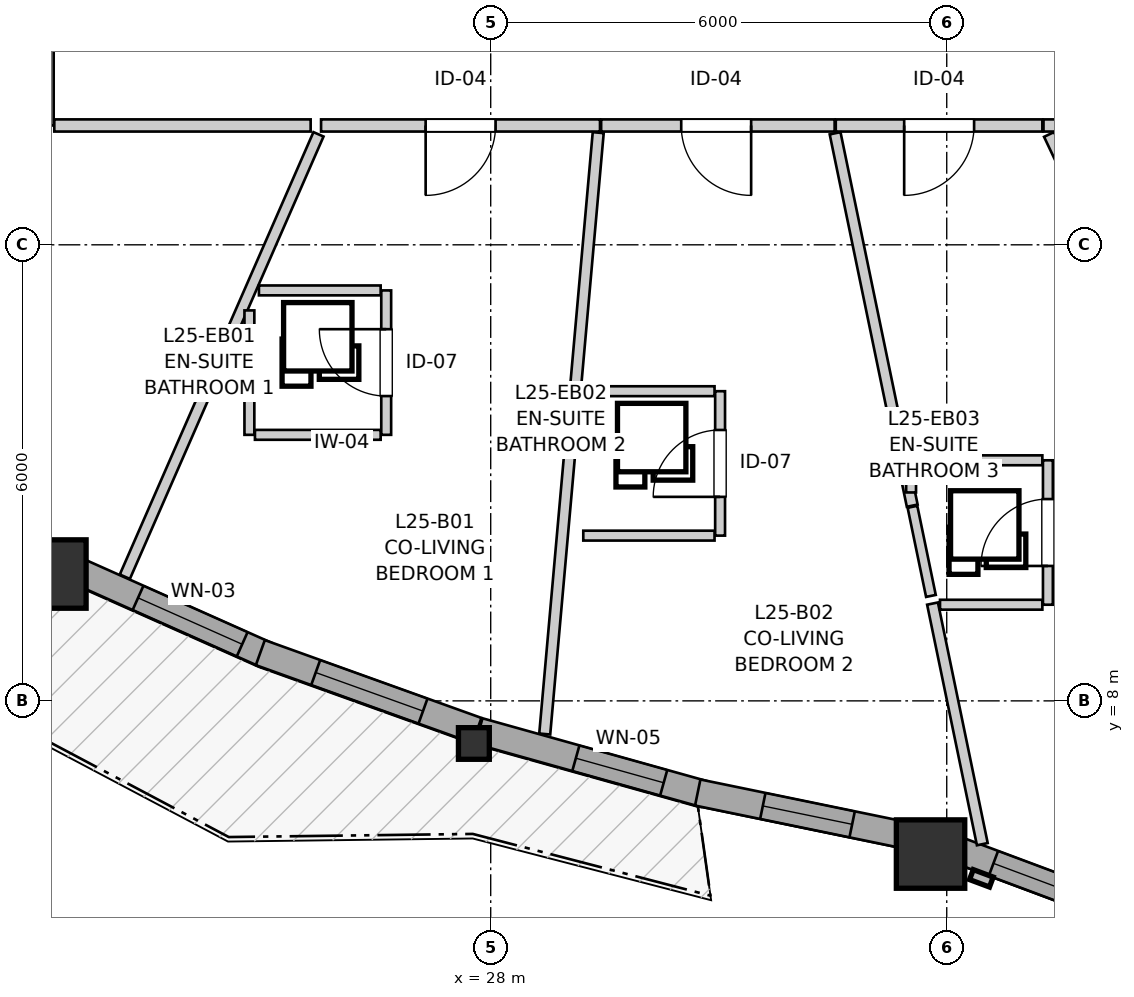
"""IFC4 building model, lengths in metres.
Left out: names, types, materials, properties, quantities, classifications, styles, units other than length and angle.
Written with IfcOpenShell. Run it as: python <this file> out.ifc"""

import sys

from ifc_helpers import new_model, si_unit, direction, frame, frame_2d, origin, origin_2d, place, context, subcontext, project, spatial, rectangle, i_section, extrude, source, transform, mapped, element, fill, save


model = new_model("IFC4")
c1 = context("Model", 3, precision=1e-05, world=origin(), true_north=direction((0.0, 1.0)))
c2 = subcontext(c1, "Body", "Model", "MODEL_VIEW")
j1 = project(units=[si_unit("LENGTHUNIT", "METRE"), si_unit("PLANEANGLEUNIT", "RADIAN")], contexts=[c1])
p1 = place(None, origin())
s1 = spatial("IfcSite", under=j1, at=p1, CompositionType="ELEMENT")
p2 = place(p1, origin())
s2 = spatial("IfcBuilding", under=s1, at=p2, CompositionType="ELEMENT")
p3 = place(p2, frame((0.0, 0.0, 86.4)))
s3 = spatial("IfcBuildingStorey", under=s2, at=p3, CompositionType="ELEMENT", Elevation=86.4)
m1 = source(origin(), c2, "Body", "SweptSolid", [
    extrude(rectangle(XDim=0.9, YDim=0.9, at=origin_2d()), origin(), (0.0, 0.0, 1.0), 2.95),
])
p4 = place(p3, frame((22.227, 9.669, 0.0), z_axis=(0.0, 0.0, 1.0), x_axis=(1.0, 0.0, 0.0)))
e1 = element("IfcColumn", 1, at=p4, inside=s3, PredefinedType="COLUMN", context=c2, shape_type="MappedRepresentation", body=[
    mapped(m1, transform((0.0, 0.0, 0.0), x_axis=(1.0, 0.0, 0.0), y_axis=(0.0, 1.0, 0.0), z_axis=(0.0, 0.0, 1.0), scale=1.0)),
])
m2 = source(origin(), c2, "Body", "SweptSolid", [
    extrude(i_section(OverallWidth=0.406, OverallDepth=0.416, WebThickness=0.027, FlangeThickness=0.044, FilletRadius=0.015, at=origin_2d()), origin(), (0.0, 0.0, 1.0), 2.95),
])
p5 = place(p3, frame((27.779, 7.439, 0.0), z_axis=(0.0, 0.0, 1.0), x_axis=(1.0, 0.0, 0.0)))
e2 = element("IfcColumn", 2, at=p5, inside=s3, PredefinedType="PILASTER", context=c2, shape_type="MappedRepresentation", body=[
    mapped(m2, transform((0.0, 0.0, 0.0), x_axis=(1.0, 0.0, 0.0), y_axis=(0.0, 1.0, 0.0), z_axis=(0.0, 0.0, 1.0), scale=1.0)),
])
p6 = place(p3, frame((33.787, 5.985, 0.0), z_axis=(0.0, 0.0, 1.0), x_axis=(1.0, 0.0, 0.0)))
e3 = element("IfcColumn", 3, at=p6, inside=s3, PredefinedType="COLUMN", context=c2, shape_type="MappedRepresentation", body=[
    mapped(m1, transform((0.0, 0.0, 0.0), x_axis=(1.0, 0.0, 0.0), y_axis=(0.0, 1.0, 0.0), z_axis=(0.0, 0.0, 1.0), scale=1.0)),
])
p7 = place(p3, frame((22.503, 9.737, 0.0), z_axis=(0.0, 0.0, 1.0), x_axis=(0.913443049169, -0.406966578388, 0.0)))
e4 = element("IfcWall", 4, at=p7, inside=s3, PredefinedType="SOLIDWALL", context=c2, shape_type="SweptSolid", body=[
    extrude(rectangle(XDim=2.79, YDim=0.35, at=frame_2d((1.395, 0.0))), origin(), (0.0, 0.0, 1.0), 2.48),
])
p8 = place(p7, frame((0.938, 0.0, 0.82)))
e5 = element("IfcOpeningElement", 5, at=p8, cuts=e4, PredefinedType="OPENING", context=c2, shape_type="SweptSolid", body=[
    extrude(rectangle(XDim=1.5, YDim=1.45, at=frame_2d((0.75, 0.725))), frame((0.0, 0.185, 0.0), z_axis=(0.0, -1.0, 0.0), x_axis=(1.0, 0.0, 0.0)), (0.0, 0.0, 1.0), 0.37),
])
p9 = place(p3, frame((24.969, 8.635, 0.0), z_axis=(0.0, 0.0, 1.0), x_axis=(0.941099972293, -0.338128440315, 0.0)))
e6 = element("IfcWall", 6, at=p9, inside=s3, PredefinedType="SOLIDWALL", context=c2, shape_type="SweptSolid", body=[
    extrude(rectangle(XDim=3.028, YDim=0.35, at=frame_2d((1.514, 0.0))), origin(), (0.0, 0.0, 1.0), 2.48),
])
p10 = place(p9, frame((0.774, 0.0, 0.82)))
e7 = element("IfcOpeningElement", 7, at=p10, cuts=e6, PredefinedType="OPENING", context=c2, shape_type="SweptSolid", body=[
    extrude(rectangle(XDim=1.5, YDim=1.45, at=frame_2d((0.75, 0.725))), frame((0.0, 0.185, 0.0), z_axis=(0.0, -1.0, 0.0), x_axis=(1.0, 0.0, 0.0)), (0.0, 0.0, 1.0), 0.37),
])
p11 = place(p3, frame((27.845, 7.603, 0.0), z_axis=(0.0, 0.0, 1.0), x_axis=(0.963041412051, -0.269353371382, 0.0)))
e8 = element("IfcWall", 8, at=p11, inside=s3, PredefinedType="SOLIDWALL", context=c2, shape_type="SweptSolid", body=[
    extrude(rectangle(XDim=3.078, YDim=0.35, at=frame_2d((1.539, 0.0))), origin(), (0.0, 0.0, 1.0), 2.48),
])
p12 = place(p11, frame((1.324, 0.0, 0.82)))
e9 = element("IfcOpeningElement", 9, at=p12, cuts=e8, PredefinedType="OPENING", context=c2, shape_type="SweptSolid", body=[
    extrude(rectangle(XDim=1.2, YDim=1.45, at=frame_2d((0.6, 0.725))), frame((0.0, 0.185, 0.0), z_axis=(0.0, -1.0, 0.0), x_axis=(1.0, 0.0, 0.0)), (0.0, 0.0, 1.0), 0.37),
])
p13 = place(p3, frame((30.724, 6.794, 0.0), z_axis=(0.0, 0.0, 1.0), x_axis=(0.979439663571, -0.201737317878, 0.0)))
e10 = element("IfcWall", 10, at=p13, inside=s3, PredefinedType="SOLIDWALL", context=c2, shape_type="SweptSolid", body=[
    extrude(rectangle(XDim=2.938, YDim=0.35, at=frame_2d((1.469, 0.0))), origin(), (0.0, 0.0, 1.0), 2.48),
])
p14 = place(p13, frame((0.874, 0.0, 0.82)))
e11 = element("IfcOpeningElement", 11, at=p14, cuts=e10, PredefinedType="OPENING", context=c2, shape_type="SweptSolid", body=[
    extrude(rectangle(XDim=1.2, YDim=1.45, at=frame_2d((0.6, 0.725))), frame((0.0, 0.185, 0.0), z_axis=(0.0, -1.0, 0.0), x_axis=(1.0, 0.0, 0.0)), (0.0, 0.0, 1.0), 0.37),
])
p15 = place(p3, frame((34.059, 6.07, 0.0), z_axis=(0.0, 0.0, 1.0), x_axis=(0.936803747811, -0.349855310219, 0.0)))
e12 = element("IfcWall", 12, at=p15, inside=s3, PredefinedType="SOLIDWALL", context=c2, shape_type="SweptSolid", body=[
    extrude(rectangle(XDim=1.836, YDim=0.35, at=frame_2d((0.918, 0.0))), origin(), (0.0, 0.0, 1.0), 2.48),
])
p16 = place(p15, frame((0.593, 0.0, 0.82)))
e13 = element("IfcOpeningElement", 13, at=p16, cuts=e12, PredefinedType="OPENING", context=c2, shape_type="SweptSolid", body=[
    extrude(rectangle(XDim=0.95, YDim=1.35, at=frame_2d((0.475, 0.675))), frame((0.0, 0.185, 0.0), z_axis=(0.0, -1.0, 0.0), x_axis=(1.0, 0.0, 0.0)), (0.0, 0.0, 1.0), 0.37),
])
p17 = place(p3, frame((22.17, 15.57, 0.0), z_axis=(0.0, 0.0, 1.0), x_axis=(0.0, 1.0, 0.0)))
e14 = element("IfcWall", 14, at=p17, inside=s3, PredefinedType="PARTITIONING", context=c2, shape_type="SweptSolid", body=[
    extrude(rectangle(XDim=5.543, YDim=0.16, at=frame_2d((2.771, 0.0))), origin(), (0.0, 0.0, 1.0), 2.95),
])
p18 = place(p17, frame((2.283, 0.0, 0.0)))
e15 = element("IfcOpeningElement", 15, at=p18, cuts=e14, PredefinedType="OPENING", context=c2, shape_type="SweptSolid", body=[
    extrude(rectangle(XDim=0.96, YDim=2.1, at=frame_2d((0.48, 1.05))), frame((0.0, 0.09, 0.0), z_axis=(0.0, -1.0, 0.0), x_axis=(1.0, 0.0, 0.0)), (0.0, 0.0, 1.0), 0.18),
])
p19 = place(p3, frame((29.438, 15.57, 0.0), z_axis=(0.0, 0.0, 1.0), x_axis=(-1.0, 0.0, 0.0)))
e16 = element("IfcWall", 16, at=p19, inside=s3, PredefinedType="PARTITIONING", context=c2, shape_type="SweptSolid", body=[
    extrude(rectangle(XDim=3.67, YDim=0.16, at=frame_2d((1.835, 0.0))), origin(), (0.0, 0.0, 1.0), 2.95),
])
p20 = place(p19, frame((1.374, 0.0, 0.0)))
e17 = element("IfcOpeningElement", 17, at=p20, cuts=e16, PredefinedType="OPENING", context=c2, shape_type="SweptSolid", body=[
    extrude(rectangle(XDim=0.92, YDim=2.1, at=frame_2d((0.46, 1.05))), frame((0.0, 0.09, 0.0), z_axis=(0.0, -1.0, 0.0), x_axis=(1.0, 0.0, 0.0)), (0.0, 0.0, 1.0), 0.18),
])
p21 = place(p3, frame((38.53, 15.57, 0.0), z_axis=(0.0, 0.0, 1.0), x_axis=(-1.0, 0.0, 0.0)))
e18 = element("IfcWall", 18, at=p21, inside=s3, PredefinedType="PARTITIONING", context=c2, shape_type="SweptSolid", body=[
    extrude(rectangle(XDim=3.257, YDim=0.16, at=frame_2d((1.628, 0.0))), origin(), (0.0, 0.0, 1.0), 2.95),
])
p22 = place(p21, frame((1.16, 0.0, 0.0)))
e19 = element("IfcOpeningElement", 19, at=p22, cuts=e18, PredefinedType="OPENING", context=c2, shape_type="SweptSolid", body=[
    extrude(rectangle(XDim=0.92, YDim=2.1, at=frame_2d((0.46, 1.05))), frame((0.0, 0.09, 0.0), z_axis=(0.0, -1.0, 0.0), x_axis=(1.0, 0.0, 0.0)), (0.0, 0.0, 1.0), 0.18),
])
p23 = place(p3, frame((32.525, 15.57, 0.0), z_axis=(0.0, 0.0, 1.0), x_axis=(-1.0, 0.0, 0.0)))
e20 = element("IfcWall", 20, at=p23, inside=s3, PredefinedType="PARTITIONING", context=c2, shape_type="SweptSolid", body=[
    extrude(rectangle(XDim=3.072, YDim=0.16, at=frame_2d((1.536, 0.0))), origin(), (0.0, 0.0, 1.0), 2.95),
])
p24 = place(p23, frame((1.098, 0.0, 0.0)))
e21 = element("IfcOpeningElement", 21, at=p24, cuts=e20, PredefinedType="OPENING", context=c2, shape_type="SweptSolid", body=[
    extrude(rectangle(XDim=0.92, YDim=2.1, at=frame_2d((0.46, 1.05))), frame((0.0, 0.09, 0.0), z_axis=(0.0, -1.0, 0.0), x_axis=(1.0, 0.0, 0.0)), (0.0, 0.0, 1.0), 0.18),
])
p25 = place(p3, frame((35.258, 15.57, 0.0), z_axis=(0.0, 0.0, 1.0), x_axis=(-1.0, 0.0, 0.0)))
e22 = element("IfcWall", 22, at=p25, inside=s3, PredefinedType="PARTITIONING", context=c2, shape_type="SweptSolid", body=[
    extrude(rectangle(XDim=2.718, YDim=0.16, at=frame_2d((1.359, 0.0))), origin(), (0.0, 0.0, 1.0), 2.95),
])
p26 = place(p25, frame((0.898, 0.0, 0.0)))
e23 = element("IfcOpeningElement", 23, at=p26, cuts=e22, PredefinedType="OPENING", context=c2, shape_type="SweptSolid", body=[
    extrude(rectangle(XDim=0.92, YDim=2.1, at=frame_2d((0.46, 1.05))), frame((0.0, 0.09, 0.0), z_axis=(0.0, -1.0, 0.0), x_axis=(1.0, 0.0, 0.0)), (0.0, 0.0, 1.0), 0.18),
])
p27 = place(p3, frame((26.625, 11.5, 0.0), z_axis=(0.0, 0.0, 1.0), x_axis=(0.0, 1.0, 0.0)))
e24 = element("IfcWall", 24, at=p27, inside=s3, PredefinedType="PARTITIONING", context=c2, shape_type="SweptSolid", body=[
    extrude(rectangle(XDim=1.9, YDim=0.13, at=frame_2d((0.95, 0.0))), origin(), (0.0, 0.0, 1.0), 2.95),
])
p28 = place(p27, frame((0.51, 0.0, 0.0)))
e25 = element("IfcOpeningElement", 25, at=p28, cuts=e24, PredefinedType="OPENING", context=c2, shape_type="SweptSolid", body=[
    extrude(rectangle(XDim=0.88, YDim=2.05, at=frame_2d((0.44, 1.025))), frame((0.0, 0.075, 0.0), z_axis=(0.0, -1.0, 0.0), x_axis=(1.0, 0.0, 0.0)), (0.0, 0.0, 1.0), 0.15),
])
p29 = place(p3, frame((31.018, 10.174, 0.0), z_axis=(0.0, 0.0, 1.0), x_axis=(0.0, 1.0, 0.0)))
e26 = element("IfcWall", 26, at=p29, inside=s3, PredefinedType="PARTITIONING", context=c2, shape_type="SweptSolid", body=[
    extrude(rectangle(XDim=1.9, YDim=0.13, at=frame_2d((0.95, 0.0))), origin(), (0.0, 0.0, 1.0), 2.95),
])
p30 = place(p29, frame((0.51, 0.0, 0.0)))
e27 = element("IfcOpeningElement", 27, at=p30, cuts=e26, PredefinedType="OPENING", context=c2, shape_type="SweptSolid", body=[
    extrude(rectangle(XDim=0.88, YDim=2.05, at=frame_2d((0.44, 1.025))), frame((0.0, 0.075, 0.0), z_axis=(0.0, -1.0, 0.0), x_axis=(1.0, 0.0, 0.0)), (0.0, 0.0, 1.0), 0.15),
])
p31 = place(p3, frame((35.331, 9.265, 0.0), z_axis=(0.0, 0.0, 1.0), x_axis=(0.0, 1.0, 0.0)))
e28 = element("IfcWall", 28, at=p31, inside=s3, PredefinedType="PARTITIONING", context=c2, shape_type="SweptSolid", body=[
    extrude(rectangle(XDim=1.9, YDim=0.13, at=frame_2d((0.95, 0.0))), origin(), (0.0, 0.0, 1.0), 2.95),
])
p32 = place(p31, frame((0.51, 0.0, 0.0)))
e29 = element("IfcOpeningElement", 29, at=p32, cuts=e28, PredefinedType="OPENING", context=c2, shape_type="SweptSolid", body=[
    extrude(rectangle(XDim=0.88, YDim=2.05, at=frame_2d((0.44, 1.025))), frame((0.0, 0.075, 0.0), z_axis=(0.0, -1.0, 0.0), x_axis=(1.0, 0.0, 0.0)), (0.0, 0.0, 1.0), 0.15),
])
p33 = place(p3, frame((28.711, 7.564, 0.0), z_axis=(0.0, 0.0, 1.0), x_axis=(0.088615013812, 0.996065951294, 0.0)))
e30 = element("IfcWall", 30, at=p33, inside=s3, PredefinedType="PARTITIONING", context=c2, shape_type="SweptSolid", body=[
    extrude(rectangle(XDim=7.943, YDim=0.145, at=frame_2d((3.971, 0.0))), origin(), (0.0, 0.0, 1.0), 2.95),
])
p34 = place(p3, frame((23.186, 9.634, 0.0), z_axis=(0.0, 0.0, 1.0), x_axis=(0.400994208685, 0.916080588486, 0.0)))
e31 = element("IfcWall", 31, at=p34, inside=s3, PredefinedType="PARTITIONING", context=c2, shape_type="SweptSolid", body=[
    extrude(rectangle(XDim=6.353, YDim=0.145, at=frame_2d((3.177, 0.0))), origin(), (0.0, 0.0, 1.0), 2.95),
])
p35 = place(p3, frame((32.531, 15.468, 0.0), z_axis=(0.0, 0.0, 1.0), x_axis=(0.202792769077, -0.979221677053, 0.0)))
e32 = element("IfcWall", 32, at=p35, inside=s3, PredefinedType="PARTITIONING", context=c2, shape_type="SweptSolid", body=[
    extrude(rectangle(XDim=5.003, YDim=0.145, at=frame_2d((2.502, 0.0))), origin(), (0.0, 0.0, 1.0), 2.95),
])
p36 = place(p3, frame((35.346, 15.452, 0.0), z_axis=(0.0, 0.0, 1.0), x_axis=(0.428023015228, -0.903767834366, 0.0)))
e33 = element("IfcWall", 33, at=p36, inside=s3, PredefinedType="PARTITIONING", context=c2, shape_type="SweptSolid", body=[
    extrude(rectangle(XDim=4.64, YDim=0.145, at=frame_2d((2.32, 0.0))), origin(), (0.0, 0.0, 1.0), 2.95),
])
p37 = place(p3, frame((22.258, 15.57, 0.0), z_axis=(0.0, 0.0, 1.0), x_axis=(1.0, 0.0, 0.0)))
e34 = element("IfcWall", 34, at=p37, inside=s3, PredefinedType="PARTITIONING", context=c2, shape_type="SweptSolid", body=[
    extrude(rectangle(XDim=3.373, YDim=0.16, at=frame_2d((1.687, 0.0))), origin(), (0.0, 0.0, 1.0), 2.95),
])
p38 = place(p3, frame((33.813, 9.28, 0.0), z_axis=(0.0, 0.0, 1.0), x_axis=(0.202648062782, -0.979251633979, 0.0)))
e35 = element("IfcWall", 35, at=p38, inside=s3, PredefinedType="PARTITIONING", context=c2, shape_type="SweptSolid", body=[
    extrude(rectangle(XDim=3.232, YDim=0.145, at=frame_2d((1.616, 0.0))), origin(), (0.0, 0.0, 1.0), 2.95),
])
p39 = place(p3, frame((24.825, 11.5, 0.0), z_axis=(0.0, 0.0, 1.0), x_axis=(0.0, 1.0, 0.0)))
e36 = element("IfcWall", 36, at=p39, inside=s3, PredefinedType="PARTITIONING", context=c2, shape_type="SweptSolid", body=[
    extrude(rectangle(XDim=1.637, YDim=0.13, at=frame_2d((0.818, 0.0))), origin(), (0.0, 0.0, 1.0), 2.95),
])
p40 = place(p3, frame((33.626, 11.165, 0.0), z_axis=(0.0, 0.0, 1.0), x_axis=(1.0, 0.0, 0.0)))
e37 = element("IfcWall", 37, at=p40, inside=s3, PredefinedType="PARTITIONING", context=c2, shape_type="SweptSolid", body=[
    extrude(rectangle(XDim=1.632, YDim=0.13, at=frame_2d((0.816, 0.0))), origin(), (0.0, 0.0, 1.0), 2.95),
])
p41 = place(p3, frame((24.898, 11.5, 0.0), z_axis=(0.0, 0.0, 1.0), x_axis=(1.0, 0.0, 0.0)))
e38 = element("IfcWall", 38, at=p41, inside=s3, PredefinedType="PARTITIONING", context=c2, shape_type="SweptSolid", body=[
    extrude(rectangle(XDim=1.654, YDim=0.13, at=frame_2d((0.827, 0.0))), origin(), (0.0, 0.0, 1.0), 2.558),
])
p42 = place(p3, frame((29.305, 12.074, 0.0), z_axis=(0.0, 0.0, 1.0), x_axis=(1.0, 0.0, 0.0)))
e39 = element("IfcWall", 39, at=p42, inside=s3, PredefinedType="PARTITIONING", context=c2, shape_type="SweptSolid", body=[
    extrude(rectangle(XDim=1.64, YDim=0.13, at=frame_2d((0.82, 0.0))), origin(), (0.0, 0.0, 1.0), 2.95),
])
p43 = place(p3, frame((29.218, 10.174, 0.0), z_axis=(0.0, 0.0, 1.0), x_axis=(1.0, 0.0, 0.0)))
e40 = element("IfcWall", 40, at=p43, inside=s3, PredefinedType="PARTITIONING", context=c2, shape_type="SweptSolid", body=[
    extrude(rectangle(XDim=1.727, YDim=0.13, at=frame_2d((0.864, 0.0))), origin(), (0.0, 0.0, 1.0), 2.558),
])
p44 = place(p3, frame((24.951, 13.4, 0.0), z_axis=(0.0, 0.0, 1.0), x_axis=(1.0, 0.0, 0.0)))
e41 = element("IfcWall", 41, at=p44, inside=s3, PredefinedType="PARTITIONING", context=c2, shape_type="SweptSolid", body=[
    extrude(rectangle(XDim=1.601, YDim=0.13, at=frame_2d((0.801, 0.0))), origin(), (0.0, 0.0, 1.0), 2.95),
])
p45 = place(p3, frame((33.912, 9.265, 0.0), z_axis=(0.0, 0.0, 1.0), x_axis=(1.0, 0.0, 0.0)))
e42 = element("IfcWall", 42, at=p45, inside=s3, PredefinedType="PARTITIONING", context=c2, shape_type="SweptSolid", body=[
    extrude(rectangle(XDim=1.346, YDim=0.13, at=frame_2d((0.673, 0.0))), origin(), (0.0, 0.0, 1.0), 2.95),
])
p46 = place(p3, frame((33.549, 10.553, 0.0), z_axis=(0.0, 0.0, 1.0), x_axis=(0.202855035592, -0.97920877985, 0.0)))
e43 = element("IfcWall", 43, at=p46, inside=s3, PredefinedType="PARTITIONING", context=c2, shape_type="SweptSolid", body=[
    extrude(rectangle(XDim=1.198, YDim=0.13, at=frame_2d((0.599, 0.0))), origin(), (0.0, 0.0, 1.0), 2.95),
])
p47 = place(p3, frame((33.531, 10.742, 0.0), z_axis=(0.0, 0.0, 1.0), x_axis=(0.0, 1.0, 0.0)))
e44 = element("IfcWall", 44, at=p47, inside=s3, PredefinedType="PARTITIONING", context=c2, shape_type="SweptSolid", body=[
    extrude(rectangle(XDim=0.35, YDim=0.13, at=frame_2d((0.175, 0.0))), origin(), (0.0, 0.0, 1.0), 2.95),
])
m3 = source(origin(), c2, "Body", "SweptSolid", [
    extrude(rectangle(XDim=1.5, YDim=1.45, at=frame_2d((0.75, 0.725))), frame((0.0, 0.03, 0.0), z_axis=(0.0, -1.0, 0.0), x_axis=(1.0, 0.0, 0.0)), (0.0, 0.0, 1.0), 0.06),
])
p48 = place(p8, origin())
e45 = element("IfcWindow", 45, at=p48, inside=s3, PartitioningType="SINGLE_PANEL", PredefinedType="WINDOW", context=c2, shape_type="MappedRepresentation", body=[
    mapped(m3, transform((0.0, 0.0, 0.0), x_axis=(1.0, 0.0, 0.0), y_axis=(0.0, 1.0, 0.0), z_axis=(0.0, 0.0, 1.0), scale=1.0)),
])
fill(e5, e45)
p49 = place(p10, origin())
e46 = element("IfcWindow", 46, at=p49, inside=s3, PartitioningType="SINGLE_PANEL", PredefinedType="WINDOW", context=c2, shape_type="MappedRepresentation", body=[
    mapped(m3, transform((0.0, 0.0, 0.0), x_axis=(1.0, 0.0, 0.0), y_axis=(0.0, 1.0, 0.0), z_axis=(0.0, 0.0, 1.0), scale=1.0)),
])
fill(e7, e46)
m4 = source(origin(), c2, "Body", "SweptSolid", [
    extrude(rectangle(XDim=1.2, YDim=1.45, at=frame_2d((0.6, 0.725))), frame((0.0, 0.03, 0.0), z_axis=(0.0, -1.0, 0.0), x_axis=(1.0, 0.0, 0.0)), (0.0, 0.0, 1.0), 0.06),
])
p50 = place(p12, origin())
e47 = element("IfcWindow", 47, at=p50, inside=s3, PartitioningType="SINGLE_PANEL", PredefinedType="WINDOW", context=c2, shape_type="MappedRepresentation", body=[
    mapped(m4, transform((0.0, 0.0, 0.0), x_axis=(1.0, 0.0, 0.0), y_axis=(0.0, 1.0, 0.0), z_axis=(0.0, 0.0, 1.0), scale=1.0)),
])
fill(e9, e47)
p51 = place(p14, origin())
e48 = element("IfcWindow", 48, at=p51, inside=s3, PartitioningType="SINGLE_PANEL", PredefinedType="WINDOW", context=c2, shape_type="MappedRepresentation", body=[
    mapped(m4, transform((0.0, 0.0, 0.0), x_axis=(1.0, 0.0, 0.0), y_axis=(0.0, 1.0, 0.0), z_axis=(0.0, 0.0, 1.0), scale=1.0)),
])
fill(e11, e48)
m5 = source(origin(), c2, "Body", "SweptSolid", [
    extrude(rectangle(XDim=0.95, YDim=1.35, at=frame_2d((0.475, 0.675))), frame((0.0, 0.03, 0.0), z_axis=(0.0, -1.0, 0.0), x_axis=(1.0, 0.0, 0.0)), (0.0, 0.0, 1.0), 0.06),
])
p52 = place(p16, origin())
e49 = element("IfcWindow", 49, at=p52, inside=s3, PartitioningType="SINGLE_PANEL", PredefinedType="WINDOW", context=c2, shape_type="MappedRepresentation", body=[
    mapped(m5, transform((0.0, 0.0, 0.0), x_axis=(1.0, 0.0, 0.0), y_axis=(0.0, 1.0, 0.0), z_axis=(0.0, 0.0, 1.0), scale=1.0)),
])
fill(e13, e49)
m6 = source(origin(), c2, "Body", "SweptSolid", [
    extrude(rectangle(XDim=0.92, YDim=2.1, at=frame_2d((0.46, 1.05))), frame((0.0, 0.025, 0.0), z_axis=(0.0, -1.0, 0.0), x_axis=(1.0, 0.0, 0.0)), (0.0, 0.0, 1.0), 0.05),
])
p53 = place(p20, origin())
e50 = element("IfcDoor", 50, at=p53, inside=s3, OperationType="SINGLE_SWING_RIGHT", PredefinedType="DOOR", context=c2, shape_type="MappedRepresentation", body=[
    mapped(m6, transform((0.0, 0.0, 0.0), x_axis=(1.0, 0.0, 0.0), y_axis=(0.0, 1.0, 0.0), z_axis=(0.0, 0.0, 1.0), scale=1.0)),
])
fill(e17, e50)
p54 = place(p24, origin())
e51 = element("IfcDoor", 51, at=p54, inside=s3, OperationType="SINGLE_SWING_LEFT", PredefinedType="DOOR", context=c2, shape_type="MappedRepresentation", body=[
    mapped(m6, transform((0.0, 0.0, 0.0), x_axis=(1.0, 0.0, 0.0), y_axis=(0.0, 1.0, 0.0), z_axis=(0.0, 0.0, 1.0), scale=1.0)),
])
fill(e21, e51)
p55 = place(p26, origin())
e52 = element("IfcDoor", 52, at=p55, inside=s3, OperationType="SINGLE_SWING_RIGHT", PredefinedType="DOOR", context=c2, shape_type="MappedRepresentation", body=[
    mapped(m6, transform((0.0, 0.0, 0.0), x_axis=(1.0, 0.0, 0.0), y_axis=(0.0, 1.0, 0.0), z_axis=(0.0, 0.0, 1.0), scale=1.0)),
])
fill(e23, e52)
m7 = source(origin(), c2, "Body", "SweptSolid", [
    extrude(rectangle(XDim=0.88, YDim=2.05, at=frame_2d((0.44, 1.025))), frame((0.0, 0.025, 0.0), z_axis=(0.0, -1.0, 0.0), x_axis=(1.0, 0.0, 0.0)), (0.0, 0.0, 1.0), 0.05),
])
p56 = place(p28, origin())
e53 = element("IfcDoor", 53, at=p56, inside=s3, OperationType="SINGLE_SWING_RIGHT", PredefinedType="DOOR", context=c2, shape_type="MappedRepresentation", body=[
    mapped(m7, transform((0.0, 0.0, 0.0), x_axis=(1.0, 0.0, 0.0), y_axis=(0.0, 1.0, 0.0), z_axis=(0.0, 0.0, 1.0), scale=1.0)),
])
fill(e25, e53)
p57 = place(p30, origin())
e54 = element("IfcDoor", 54, at=p57, inside=s3, OperationType="SINGLE_SWING_LEFT", PredefinedType="DOOR", context=c2, shape_type="MappedRepresentation", body=[
    mapped(m7, transform((0.0, 0.0, 0.0), x_axis=(1.0, 0.0, 0.0), y_axis=(0.0, 1.0, 0.0), z_axis=(0.0, 0.0, 1.0), scale=1.0)),
])
fill(e27, e54)
p58 = place(p32, origin())
e55 = element("IfcDoor", 55, at=p58, inside=s3, OperationType="SINGLE_SWING_LEFT", PredefinedType="DOOR", context=c2, shape_type="MappedRepresentation", body=[
    mapped(m7, transform((0.0, 0.0, 0.0), x_axis=(1.0, 0.0, 0.0), y_axis=(0.0, 1.0, 0.0), z_axis=(0.0, 0.0, 1.0), scale=1.0)),
])
fill(e29, e55)
save(model, sys.argv[1])
